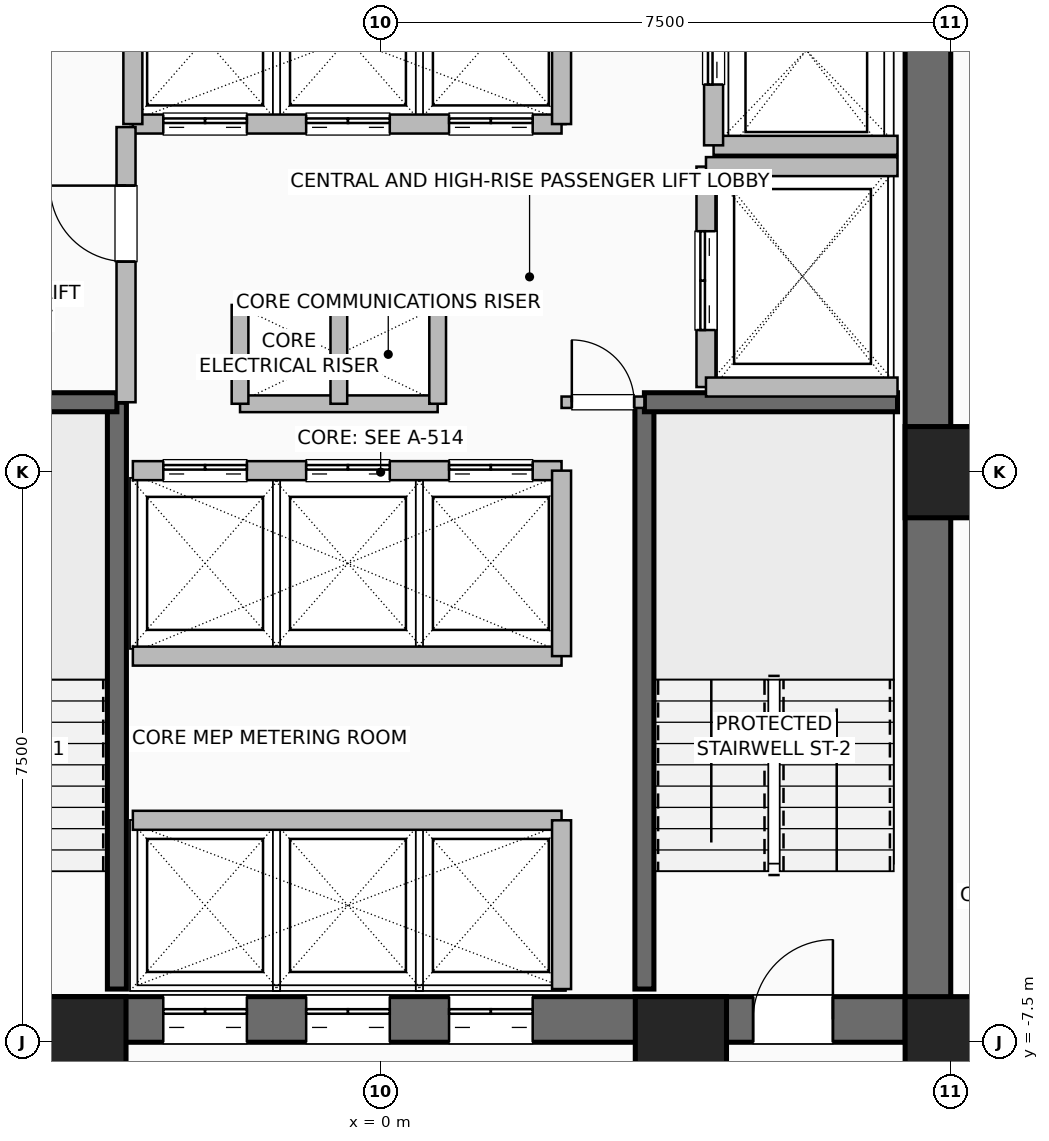
"""IFC4 building model, lengths in metres.
Left out: names, types, materials, properties, quantities, classifications, styles, units other than length and angle.
Written with IfcOpenShell. Run it as: python <this file> out.ifc"""

import sys

from ifc_helpers import new_model, si_unit, direction, frame, frame_2d, origin, origin_2d, place, context, subcontext, project, spatial, rectangle, hollow_rectangle, extrude, element, fill, save


model = new_model("IFC4")
c1 = context("Model", 3, precision=1e-05, world=origin(), true_north=direction((0.0, 1.0)))
c2 = subcontext(c1, "Body", "Model", "MODEL_VIEW")
j1 = project(units=[si_unit("LENGTHUNIT", "METRE"), si_unit("PLANEANGLEUNIT", "RADIAN")], contexts=[c1])
p1 = place(None, origin())
s1 = spatial("IfcSite", under=j1, at=p1, CompositionType="ELEMENT")
p2 = place(p1, origin())
s2 = spatial("IfcBuilding", under=s1, at=p2, CompositionType="ELEMENT")
p3 = place(p2, frame((0.0, 0.0, 51.5)))
s3 = spatial("IfcBuildingStorey", under=s2, at=p3, CompositionType="ELEMENT", Elevation=51.5)
for number, where, z_axis, x_axis in (
    (1, (-3.95, -7.5, 0.0), (0.0, 0.0, 1.0), (1.0, 0.0, 0.0)),
    (2, (3.95, -7.5, 0.0), (0.0, 0.0, 1.0), (1.0, 0.0, 0.0)),
    (3, (7.5, -7.5, 0.0), (0.0, 0.0, 1.0), (1.0, 0.0, 0.0)),
    (4, (7.5, 0.0, 0.0), (0.0, 0.0, 1.0), (1.0, 0.0, 0.0)),
):
    element("IfcColumn", number, at=place(p3, frame(where, z_axis=z_axis, x_axis=x_axis)), inside=s3, PredefinedType="COLUMN", context=c2, shape_type="SweptSolid", body=[
        extrude(hollow_rectangle(XDim=1.2, YDim=1.2, WallThickness=0.055, at=origin_2d()), origin(), (0.0, 0.0, 1.0), 3.5),
    ])
p4 = place(p3, frame((-7.5, -7.2, 0.0), z_axis=(0.0, 0.0, 1.0), x_axis=(1.0, 0.0, 0.0)))
e5 = element("IfcWall", 5, at=p4, inside=s3, PredefinedType="SHEAR", context=c2, shape_type="SweptSolid", body=[
    extrude(rectangle(XDim=15.0, YDim=0.6, at=frame_2d((7.5, 0.0))), origin(), (0.0, 0.0, 1.0), 3.25),
])
p5 = place(p4, frame((1.55, 0.0, 0.0)))
e6 = element("IfcOpeningElement", 6, at=p5, cuts=e5, PredefinedType="OPENING", context=c2, shape_type="SweptSolid", body=[
    extrude(rectangle(XDim=1.05, YDim=2.08, at=frame_2d((0.525, 1.04))), frame((0.0, 0.31, 0.0), z_axis=(0.0, -1.0, 0.0), x_axis=(1.0, 0.0, 0.0)), (0.0, 0.0, 1.0), 0.62),
])
p6 = place(p4, frame((12.4, 0.0, 0.0)))
e7 = element("IfcOpeningElement", 7, at=p6, cuts=e5, PredefinedType="OPENING", context=c2, shape_type="SweptSolid", body=[
    extrude(rectangle(XDim=1.05, YDim=2.08, at=frame_2d((0.525, 1.04))), frame((0.0, 0.31, 0.0), z_axis=(0.0, -1.0, 0.0), x_axis=(1.0, 0.0, 0.0)), (0.0, 0.0, 1.0), 0.62),
])
p7 = place(p4, frame((4.64, 0.0, 0.0)))
e8 = element("IfcOpeningElement", 8, at=p7, cuts=e5, PredefinedType="OPENING", context=c2, shape_type="SweptSolid", body=[
    extrude(rectangle(XDim=1.1, YDim=2.2, at=frame_2d((0.55, 1.1))), frame((0.0, 0.31, 0.0), z_axis=(0.0, -1.0, 0.0), x_axis=(1.0, 0.0, 0.0)), (0.0, 0.0, 1.0), 0.62),
])
p8 = place(p4, frame((6.52, 0.0, 0.0)))
e9 = element("IfcOpeningElement", 9, at=p8, cuts=e5, PredefinedType="OPENING", context=c2, shape_type="SweptSolid", body=[
    extrude(rectangle(XDim=1.1, YDim=2.2, at=frame_2d((0.55, 1.1))), frame((0.0, 0.31, 0.0), z_axis=(0.0, -1.0, 0.0), x_axis=(1.0, 0.0, 0.0)), (0.0, 0.0, 1.0), 0.62),
])
p9 = place(p4, frame((8.4, 0.0, 0.0)))
e10 = element("IfcOpeningElement", 10, at=p9, cuts=e5, PredefinedType="OPENING", context=c2, shape_type="SweptSolid", body=[
    extrude(rectangle(XDim=1.1, YDim=2.2, at=frame_2d((0.55, 1.1))), frame((0.0, 0.31, 0.0), z_axis=(0.0, -1.0, 0.0), x_axis=(1.0, 0.0, 0.0)), (0.0, 0.0, 1.0), 0.62),
])
p10 = place(p3, frame((7.2, -7.5, 0.0), z_axis=(0.0, 0.0, 1.0), x_axis=(0.0, 1.0, 0.0)))
e11 = element("IfcWall", 11, at=p10, inside=s3, PredefinedType="SHEAR", context=c2, shape_type="SweptSolid", body=[
    extrude(rectangle(XDim=15.0, YDim=0.6, at=frame_2d((7.5, 0.0))), origin(), (0.0, 0.0, 1.0), 3.25),
])
p11 = place(p3, frame((-3.47, -6.8, 0.0), z_axis=(0.0, 0.0, 1.0), x_axis=(0.0, 1.0, 0.0)))
e12 = element("IfcWall", 12, at=p11, inside=s3, PredefinedType="SHEAR", context=c2, shape_type="SweptSolid", body=[
    extrude(rectangle(XDim=7.72, YDim=0.25, at=frame_2d((3.86, 0.0))), origin(), (0.0, 0.0, 1.0), 3.25),
])
p12 = place(p3, frame((-6.8, 0.92, 0.0), z_axis=(0.0, 0.0, 1.0), x_axis=(1.0, 0.0, 0.0)))
e13 = element("IfcWall", 13, at=p12, inside=s3, PredefinedType="SHEAR", context=c2, shape_type="SweptSolid", body=[
    extrude(rectangle(XDim=3.33, YDim=0.25, at=frame_2d((1.665, 0.0))), origin(), (0.0, 0.0, 1.0), 3.25),
])
p13 = place(p3, frame((3.47, -6.8, 0.0), z_axis=(0.0, 0.0, 1.0), x_axis=(0.0, 1.0, 0.0)))
e14 = element("IfcWall", 14, at=p13, inside=s3, PredefinedType="SHEAR", context=c2, shape_type="SweptSolid", body=[
    extrude(rectangle(XDim=7.72, YDim=0.25, at=frame_2d((3.86, 0.0))), origin(), (0.0, 0.0, 1.0), 3.25),
])
p14 = place(p3, frame((3.47, 0.92, 0.0), z_axis=(0.0, 0.0, 1.0), x_axis=(1.0, 0.0, 0.0)))
e15 = element("IfcWall", 15, at=p14, inside=s3, PredefinedType="SHEAR", context=c2, shape_type="SweptSolid", body=[
    extrude(rectangle(XDim=3.33, YDim=0.25, at=frame_2d((1.665, 0.0))), origin(), (0.0, 0.0, 1.0), 3.25),
])
for number, where, z_axis, x_axis in (
    (16, (-1.85, 2.2, 0.0), (0.0, 0.0, 1.0), (1.0, 0.0, 0.0)),
    (17, (-1.85, 0.9, 0.0), (0.0, 0.0, 1.0), (1.0, 0.0, 0.0)),
):
    element("IfcWall", number, at=place(p3, frame(where, z_axis=z_axis, x_axis=x_axis)), inside=s3, PredefinedType="PARTITIONING", context=c2, shape_type="SweptSolid", body=[
        extrude(rectangle(XDim=2.6, YDim=0.22, at=frame_2d((1.3, 0.0))), origin(), (0.0, 0.0, 1.0), 3.25),
    ])
for number, where, z_axis, x_axis in (
    (18, (-0.55, 0.9, 0.0), (0.0, 0.0, 1.0), (0.0, 1.0, 0.0)),
    (19, (0.75, 0.9, 0.0), (0.0, 0.0, 1.0), (0.0, 1.0, 0.0)),
    (20, (-1.85, 0.9, 0.0), (0.0, 0.0, 1.0), (0.0, 1.0, 0.0)),
):
    element("IfcWall", number, at=place(p3, frame(where, z_axis=z_axis, x_axis=x_axis)), inside=s3, PredefinedType="PARTITIONING", context=c2, shape_type="SweptSolid", body=[
        extrude(rectangle(XDim=1.3, YDim=0.22, at=frame_2d((0.65, 0.0))), origin(), (0.0, 0.0, 1.0), 3.25),
    ])
p15 = place(p3, frame((-3.26, -4.58, 0.0), z_axis=(0.0, 0.0, 1.0), x_axis=(1.0, 0.0, 0.0)))
e21 = element("IfcWall", 21, at=p15, inside=s3, PredefinedType="SHEAR", context=c2, shape_type="SweptSolid", body=[
    extrude(rectangle(XDim=5.64, YDim=0.25, at=frame_2d((2.82, 0.0))), origin(), (0.0, 0.0, 1.0), 3.25),
])
p16 = place(p3, frame((2.38, -6.8, 0.0), z_axis=(0.0, 0.0, 1.0), x_axis=(0.0, 1.0, 0.0)))
e22 = element("IfcWall", 22, at=p16, inside=s3, PredefinedType="SHEAR", context=c2, shape_type="SweptSolid", body=[
    extrude(rectangle(XDim=2.22, YDim=0.25, at=frame_2d((1.11, 0.0))), origin(), (0.0, 0.0, 1.0), 3.25),
])
p17 = place(p3, frame((-3.26, 0.02, 0.0), z_axis=(0.0, 0.0, 1.0), x_axis=(1.0, 0.0, 0.0)))
e23 = element("IfcWall", 23, at=p17, inside=s3, PredefinedType="SHEAR", context=c2, shape_type="SweptSolid", body=[
    extrude(rectangle(XDim=5.64, YDim=0.25, at=frame_2d((2.82, 0.0))), origin(), (0.0, 0.0, 1.0), 3.25),
])
p18 = place(p17, frame((0.4, 0.0, 0.0)))
e24 = element("IfcOpeningElement", 24, at=p18, cuts=e23, PredefinedType="OPENING", context=c2, shape_type="SweptSolid", body=[
    extrude(rectangle(XDim=1.1, YDim=2.2, at=frame_2d((0.55, 1.1))), frame((0.0, 0.135, 0.0), z_axis=(0.0, -1.0, 0.0), x_axis=(1.0, 0.0, 0.0)), (0.0, 0.0, 1.0), 0.27),
])
p19 = place(p17, frame((2.28, 0.0, 0.0)))
e25 = element("IfcOpeningElement", 25, at=p19, cuts=e23, PredefinedType="OPENING", context=c2, shape_type="SweptSolid", body=[
    extrude(rectangle(XDim=1.1, YDim=2.2, at=frame_2d((0.55, 1.1))), frame((0.0, 0.135, 0.0), z_axis=(0.0, -1.0, 0.0), x_axis=(1.0, 0.0, 0.0)), (0.0, 0.0, 1.0), 0.27),
])
p20 = place(p17, frame((4.16, 0.0, 0.0)))
e26 = element("IfcOpeningElement", 26, at=p20, cuts=e23, PredefinedType="OPENING", context=c2, shape_type="SweptSolid", body=[
    extrude(rectangle(XDim=1.1, YDim=2.2, at=frame_2d((0.55, 1.1))), frame((0.0, 0.135, 0.0), z_axis=(0.0, -1.0, 0.0), x_axis=(1.0, 0.0, 0.0)), (0.0, 0.0, 1.0), 0.27),
])
p21 = place(p3, frame((-3.26, -2.42, 0.0), z_axis=(0.0, 0.0, 1.0), x_axis=(1.0, 0.0, 0.0)))
e27 = element("IfcWall", 27, at=p21, inside=s3, PredefinedType="SHEAR", context=c2, shape_type="SweptSolid", body=[
    extrude(rectangle(XDim=5.64, YDim=0.25, at=frame_2d((2.82, 0.0))), origin(), (0.0, 0.0, 1.0), 3.25),
])
p22 = place(p3, frame((2.38, -2.42, 0.0), z_axis=(0.0, 0.0, 1.0), x_axis=(0.0, 1.0, 0.0)))
e28 = element("IfcWall", 28, at=p22, inside=s3, PredefinedType="SHEAR", context=c2, shape_type="SweptSolid", body=[
    extrude(rectangle(XDim=2.44, YDim=0.25, at=frame_2d((1.22, 0.0))), origin(), (0.0, 0.0, 1.0), 3.25),
])
p23 = place(p3, frame((-3.26, 4.58, 0.0), z_axis=(0.0, 0.0, 1.0), x_axis=(1.0, 0.0, 0.0)))
e29 = element("IfcWall", 29, at=p23, inside=s3, PredefinedType="SHEAR", context=c2, shape_type="SweptSolid", body=[
    extrude(rectangle(XDim=5.64, YDim=0.25, at=frame_2d((2.82, 0.0))), origin(), (0.0, 0.0, 1.0), 3.25),
])
p24 = place(p23, frame((0.4, 0.0, 0.0)))
e30 = element("IfcOpeningElement", 30, at=p24, cuts=e29, PredefinedType="OPENING", context=c2, shape_type="SweptSolid", body=[
    extrude(rectangle(XDim=1.1, YDim=2.2, at=frame_2d((0.55, 1.1))), frame((0.0, 0.135, 0.0), z_axis=(0.0, -1.0, 0.0), x_axis=(1.0, 0.0, 0.0)), (0.0, 0.0, 1.0), 0.27),
])
p25 = place(p23, frame((2.28, 0.0, 0.0)))
e31 = element("IfcOpeningElement", 31, at=p25, cuts=e29, PredefinedType="OPENING", context=c2, shape_type="SweptSolid", body=[
    extrude(rectangle(XDim=1.1, YDim=2.2, at=frame_2d((0.55, 1.1))), frame((0.0, 0.135, 0.0), z_axis=(0.0, -1.0, 0.0), x_axis=(1.0, 0.0, 0.0)), (0.0, 0.0, 1.0), 0.27),
])
p26 = place(p23, frame((4.16, 0.0, 0.0)))
e32 = element("IfcOpeningElement", 32, at=p26, cuts=e29, PredefinedType="OPENING", context=c2, shape_type="SweptSolid", body=[
    extrude(rectangle(XDim=1.1, YDim=2.2, at=frame_2d((0.55, 1.1))), frame((0.0, 0.135, 0.0), z_axis=(0.0, -1.0, 0.0), x_axis=(1.0, 0.0, 0.0)), (0.0, 0.0, 1.0), 0.27),
])
for number, where, z_axis, x_axis in (
    (33, (-3.26, 4.58, 0.0), (0.0, 0.0, 1.0), (0.0, 1.0, 0.0)),
    (34, (2.38, 4.58, 0.0), (0.0, 0.0, 1.0), (0.0, 1.0, 0.0)),
):
    element("IfcWall", number, at=place(p3, frame(where, z_axis=z_axis, x_axis=x_axis)), inside=s3, PredefinedType="SHEAR", context=c2, shape_type="SweptSolid", body=[
        extrude(rectangle(XDim=2.22, YDim=0.25, at=frame_2d((1.11, 0.0))), origin(), (0.0, 0.0, 1.0), 3.25),
    ])
p27 = place(p3, frame((4.38, 4.3, 0.0), z_axis=(0.0, 0.0, 1.0), x_axis=(1.0, 0.0, 0.0)))
e35 = element("IfcWall", 35, at=p27, inside=s3, PredefinedType="SHEAR", context=c2, shape_type="SweptSolid", body=[
    extrude(rectangle(XDim=2.42, YDim=0.25, at=frame_2d((1.21, 0.0))), origin(), (0.0, 0.0, 1.0), 3.25),
])
p28 = place(p3, frame((4.38, 4.3, 0.0), z_axis=(0.0, 0.0, 1.0), x_axis=(0.0, 1.0, 0.0)))
e36 = element("IfcWall", 36, at=p28, inside=s3, PredefinedType="SHEAR", context=c2, shape_type="SweptSolid", body=[
    extrude(rectangle(XDim=2.5, YDim=0.25, at=frame_2d((1.25, 0.0))), origin(), (0.0, 0.0, 1.0), 3.25),
])
p29 = place(p28, frame((0.8, 0.0, 0.0)))
e37 = element("IfcOpeningElement", 37, at=p29, cuts=e36, PredefinedType="OPENING", context=c2, shape_type="SweptSolid", body=[
    extrude(rectangle(XDim=1.2, YDim=2.2, at=frame_2d((0.6, 1.1))), frame((0.0, 0.135, 0.0), z_axis=(0.0, -1.0, 0.0), x_axis=(1.0, 0.0, 0.0)), (0.0, 0.0, 1.0), 0.27),
])
p30 = place(p3, frame((4.28, 1.12, 0.0), z_axis=(0.0, 0.0, 1.0), x_axis=(0.0, 1.0, 0.0)))
e38 = element("IfcWall", 38, at=p30, inside=s3, PredefinedType="SHEAR", context=c2, shape_type="SweptSolid", body=[
    extrude(rectangle(XDim=2.9, YDim=0.25, at=frame_2d((1.45, 0.0))), origin(), (0.0, 0.0, 1.0), 3.25),
])
p31 = place(p30, frame((0.75, 0.0, 0.0)))
e39 = element("IfcOpeningElement", 39, at=p31, cuts=e38, PredefinedType="OPENING", context=c2, shape_type="SweptSolid", body=[
    extrude(rectangle(XDim=1.3, YDim=2.3, at=frame_2d((0.65, 1.15))), frame((0.0, 0.135, 0.0), z_axis=(0.0, -1.0, 0.0), x_axis=(1.0, 0.0, 0.0)), (0.0, 0.0, 1.0), 0.27),
])
for number, where, z_axis, x_axis in (
    (40, (4.28, 1.12, 0.0), (0.0, 0.0, 1.0), (1.0, 0.0, 0.0)),
    (41, (4.28, 4.02, 0.0), (0.0, 0.0, 1.0), (1.0, 0.0, 0.0)),
):
    element("IfcWall", number, at=place(p3, frame(where, z_axis=z_axis, x_axis=x_axis)), inside=s3, PredefinedType="SHEAR", context=c2, shape_type="SweptSolid", body=[
        extrude(rectangle(XDim=2.52, YDim=0.25, at=frame_2d((1.26, 0.0))), origin(), (0.0, 0.0, 1.0), 3.25),
    ])
p32 = place(p3, frame((-3.35, 0.92, 0.0), z_axis=(0.0, 0.0, 1.0), x_axis=(0.0, 1.0, 0.0)))
e42 = element("IfcWall", 42, at=p32, inside=s3, PredefinedType="SHEAR", context=c2, shape_type="SweptSolid", body=[
    extrude(rectangle(XDim=3.62, YDim=0.25, at=frame_2d((1.81, 0.0))), origin(), (0.0, 0.0, 1.0), 3.25),
])
p33 = place(p32, frame((1.85, 0.0, 0.0)))
e43 = element("IfcOpeningElement", 43, at=p33, cuts=e42, PredefinedType="OPENING", context=c2, shape_type="SweptSolid", body=[
    extrude(rectangle(XDim=1.0, YDim=2.08, at=frame_2d((0.5, 1.04))), frame((0.0, 0.135, 0.0), z_axis=(0.0, -1.0, 0.0), x_axis=(1.0, 0.0, 0.0)), (0.0, 0.0, 1.0), 0.27),
])
p34 = place(p3, frame((2.38, 0.92, 0.0), z_axis=(0.0, 0.0, 1.0), x_axis=(1.0, 0.0, 0.0)))
e44 = element("IfcWall", 44, at=p34, inside=s3, PredefinedType="PARTITIONING", context=c2, shape_type="SweptSolid", body=[
    extrude(rectangle(XDim=1.09, YDim=0.15, at=frame_2d((0.545, 0.0))), origin(), (0.0, 0.0, 1.0), 3.25),
])
p35 = place(p34, frame((0.135, 0.0, 0.0)))
e45 = element("IfcOpeningElement", 45, at=p35, cuts=e44, PredefinedType="OPENING", context=c2, shape_type="SweptSolid", body=[
    extrude(rectangle(XDim=0.82, YDim=2.05, at=frame_2d((0.41, 1.025))), frame((0.0, 0.085, 0.0), z_axis=(0.0, -1.0, 0.0), x_axis=(1.0, 0.0, 0.0)), (0.0, 0.0, 1.0), 0.17),
])
p36 = place(p6, origin())
e46 = element("IfcDoor", 46, at=p36, inside=s3, OperationType="SINGLE_SWING_RIGHT", PredefinedType="DOOR", context=c2, shape_type="SweptSolid", body=[
    extrude(rectangle(XDim=1.05, YDim=2.08, at=frame_2d((0.525, 1.04))), frame((0.0, 0.025, 0.0), z_axis=(0.0, -1.0, 0.0), x_axis=(1.0, 0.0, 0.0)), (0.0, 0.0, 1.0), 0.05),
])
fill(e7, e46)
p37 = place(p7, origin())
e47 = element("IfcDoor", 47, at=p37, inside=s3, OperationType="DOUBLE_DOOR_SLIDING", PredefinedType="DOOR", context=c2, shape_type="SweptSolid", body=[
    extrude(rectangle(XDim=1.1, YDim=2.2, at=frame_2d((0.55, 1.1))), frame((0.0, 0.025, 0.0), z_axis=(0.0, -1.0, 0.0), x_axis=(1.0, 0.0, 0.0)), (0.0, 0.0, 1.0), 0.05),
])
fill(e8, e47)
p38 = place(p8, origin())
e48 = element("IfcDoor", 48, at=p38, inside=s3, OperationType="DOUBLE_DOOR_SLIDING", PredefinedType="DOOR", context=c2, shape_type="SweptSolid", body=[
    extrude(rectangle(XDim=1.1, YDim=2.2, at=frame_2d((0.55, 1.1))), frame((0.0, 0.025, 0.0), z_axis=(0.0, -1.0, 0.0), x_axis=(1.0, 0.0, 0.0)), (0.0, 0.0, 1.0), 0.05),
])
fill(e9, e48)
p39 = place(p9, origin())
e49 = element("IfcDoor", 49, at=p39, inside=s3, OperationType="DOUBLE_DOOR_SLIDING", PredefinedType="DOOR", context=c2, shape_type="SweptSolid", body=[
    extrude(rectangle(XDim=1.1, YDim=2.2, at=frame_2d((0.55, 1.1))), frame((0.0, 0.025, 0.0), z_axis=(0.0, -1.0, 0.0), x_axis=(1.0, 0.0, 0.0)), (0.0, 0.0, 1.0), 0.05),
])
fill(e10, e49)
p40 = place(p18, origin())
e50 = element("IfcDoor", 50, at=p40, inside=s3, OperationType="DOUBLE_DOOR_SLIDING", PredefinedType="DOOR", context=c2, shape_type="SweptSolid", body=[
    extrude(rectangle(XDim=1.1, YDim=2.2, at=frame_2d((0.55, 1.1))), frame((0.0, 0.025, 0.0), z_axis=(0.0, -1.0, 0.0), x_axis=(1.0, 0.0, 0.0)), (0.0, 0.0, 1.0), 0.05),
])
fill(e24, e50)
p41 = place(p19, origin())
e51 = element("IfcDoor", 51, at=p41, inside=s3, OperationType="DOUBLE_DOOR_SLIDING", PredefinedType="DOOR", context=c2, shape_type="SweptSolid", body=[
    extrude(rectangle(XDim=1.1, YDim=2.2, at=frame_2d((0.55, 1.1))), frame((0.0, 0.025, 0.0), z_axis=(0.0, -1.0, 0.0), x_axis=(1.0, 0.0, 0.0)), (0.0, 0.0, 1.0), 0.05),
])
fill(e25, e51)
p42 = place(p20, origin())
e52 = element("IfcDoor", 52, at=p42, inside=s3, OperationType="DOUBLE_DOOR_SLIDING", PredefinedType="DOOR", context=c2, shape_type="SweptSolid", body=[
    extrude(rectangle(XDim=1.1, YDim=2.2, at=frame_2d((0.55, 1.1))), frame((0.0, 0.025, 0.0), z_axis=(0.0, -1.0, 0.0), x_axis=(1.0, 0.0, 0.0)), (0.0, 0.0, 1.0), 0.05),
])
fill(e26, e52)
p43 = place(p24, origin())
e53 = element("IfcDoor", 53, at=p43, inside=s3, OperationType="DOUBLE_DOOR_SLIDING", PredefinedType="DOOR", context=c2, shape_type="SweptSolid", body=[
    extrude(rectangle(XDim=1.1, YDim=2.2, at=frame_2d((0.55, 1.1))), frame((0.0, 0.025, 0.0), z_axis=(0.0, -1.0, 0.0), x_axis=(1.0, 0.0, 0.0)), (0.0, 0.0, 1.0), 0.05),
])
fill(e30, e53)
p44 = place(p25, origin())
e54 = element("IfcDoor", 54, at=p44, inside=s3, OperationType="DOUBLE_DOOR_SLIDING", PredefinedType="DOOR", context=c2, shape_type="SweptSolid", body=[
    extrude(rectangle(XDim=1.1, YDim=2.2, at=frame_2d((0.55, 1.1))), frame((0.0, 0.025, 0.0), z_axis=(0.0, -1.0, 0.0), x_axis=(1.0, 0.0, 0.0)), (0.0, 0.0, 1.0), 0.05),
])
fill(e31, e54)
p45 = place(p26, origin())
e55 = element("IfcDoor", 55, at=p45, inside=s3, OperationType="DOUBLE_DOOR_SLIDING", PredefinedType="DOOR", context=c2, shape_type="SweptSolid", body=[
    extrude(rectangle(XDim=1.1, YDim=2.2, at=frame_2d((0.55, 1.1))), frame((0.0, 0.025, 0.0), z_axis=(0.0, -1.0, 0.0), x_axis=(1.0, 0.0, 0.0)), (0.0, 0.0, 1.0), 0.05),
])
fill(e32, e55)
p46 = place(p29, origin())
e56 = element("IfcDoor", 56, at=p46, inside=s3, OperationType="DOUBLE_DOOR_SLIDING", PredefinedType="DOOR", context=c2, shape_type="SweptSolid", body=[
    extrude(rectangle(XDim=1.2, YDim=2.2, at=frame_2d((0.6, 1.1))), frame((0.0, 0.025, 0.0), z_axis=(0.0, -1.0, 0.0), x_axis=(1.0, 0.0, 0.0)), (0.0, 0.0, 1.0), 0.05),
])
fill(e37, e56)
p47 = place(p31, origin())
e57 = element("IfcDoor", 57, at=p47, inside=s3, OperationType="DOUBLE_DOOR_SLIDING", PredefinedType="DOOR", context=c2, shape_type="SweptSolid", body=[
    extrude(rectangle(XDim=1.3, YDim=2.3, at=frame_2d((0.65, 1.15))), frame((0.0, 0.025, 0.0), z_axis=(0.0, -1.0, 0.0), x_axis=(1.0, 0.0, 0.0)), (0.0, 0.0, 1.0), 0.05),
])
fill(e39, e57)
p48 = place(p33, origin())
e58 = element("IfcDoor", 58, at=p48, inside=s3, OperationType="SINGLE_SWING_RIGHT", PredefinedType="DOOR", context=c2, shape_type="SweptSolid", body=[
    extrude(rectangle(XDim=1.0, YDim=2.08, at=frame_2d((0.5, 1.04))), frame((0.0, 0.025, 0.0), z_axis=(0.0, -1.0, 0.0), x_axis=(1.0, 0.0, 0.0)), (0.0, 0.0, 1.0), 0.05),
])
fill(e43, e58)
p49 = place(p35, origin())
e59 = element("IfcDoor", 59, at=p49, inside=s3, OperationType="SINGLE_SWING_LEFT", PredefinedType="DOOR", context=c2, shape_type="SweptSolid", body=[
    extrude(rectangle(XDim=0.82, YDim=2.05, at=frame_2d((0.41, 1.025))), frame((0.0, 0.025, 0.0), z_axis=(0.0, -1.0, 0.0), x_axis=(1.0, 0.0, 0.0)), (0.0, 0.0, 1.0), 0.05),
])
fill(e45, e59)
save(model, sys.argv[1])
